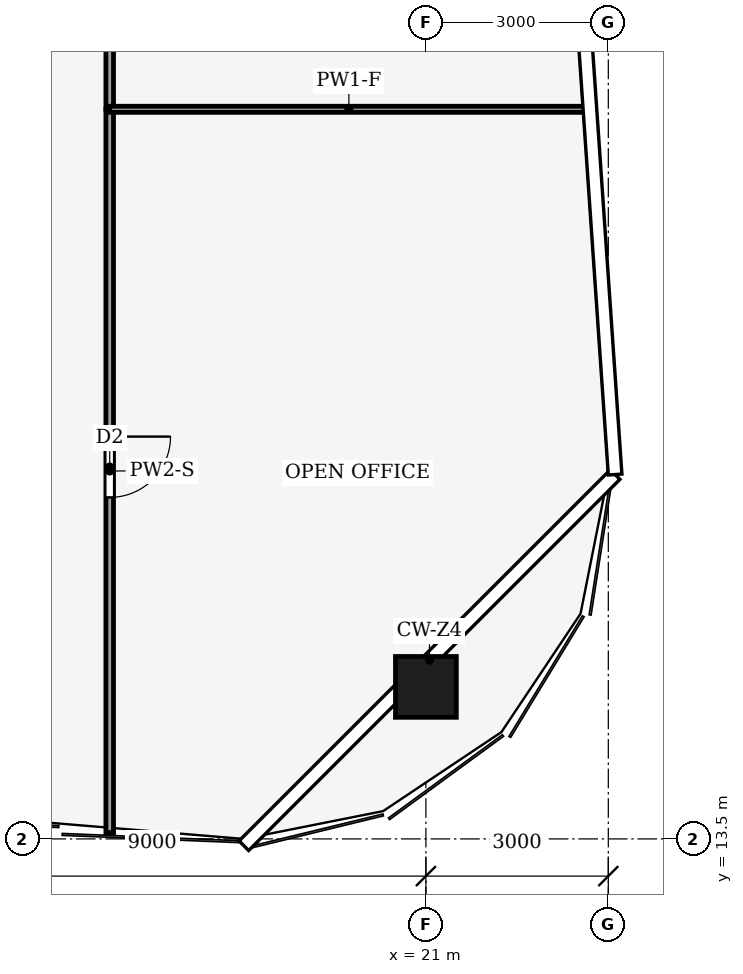
"""IFC4 building model, lengths in metres.
Left out: names, types, materials, properties, quantities, classifications, styles, units other than length and angle.
Written with IfcOpenShell. Run it as: python <this file> out.ifc"""

import sys

from ifc_helpers import new_model, si_unit, direction, frame, frame_2d, origin, origin_2d, place, context, subcontext, project, spatial, rectangle, hollow_rectangle, extrude, element, fill, save


model = new_model("IFC4")
c1 = context("Model", 3, precision=1e-05, world=origin(), true_north=direction((0.0, 1.0)))
c2 = subcontext(c1, "Body", "Model", "MODEL_VIEW")
j1 = project(units=[si_unit("LENGTHUNIT", "METRE"), si_unit("PLANEANGLEUNIT", "RADIAN")], contexts=[c1])
p1 = place(None, origin())
s1 = spatial("IfcSite", under=j1, at=p1, CompositionType="ELEMENT")
p2 = place(p1, origin())
s2 = spatial("IfcBuilding", under=s1, at=p2, CompositionType="ELEMENT")
p3 = place(p2, frame((0.0, 0.0, 246.0)))
s3 = spatial("IfcBuildingStorey", under=s2, at=p3, CompositionType="ELEMENT", Elevation=246.0)
p4 = place(p3, frame((21.0, 16.0, 0.0), z_axis=(0.0, 0.0, 1.0), x_axis=(1.0, 0.0, 0.0)))
e1 = element("IfcColumn", 1, at=p4, inside=s3, PredefinedType="COLUMN", context=c2, shape_type="SweptSolid", body=[
    extrude(hollow_rectangle(XDim=1.0, YDim=1.0, WallThickness=0.045, at=origin_2d()), origin(), (0.0, 0.0, 1.0), 4.0),
])
p5 = place(p3, frame((15.8, 25.5, 0.0), z_axis=(0.0, 0.0, 1.0), x_axis=(0.0, -1.0, 0.0)))
e2 = element("IfcWall", 2, at=p5, inside=s3, PredefinedType="PARTITIONING", context=c2, shape_type="SweptSolid", body=[
    extrude(rectangle(XDim=11.897, YDim=0.125, at=frame_2d((5.948, 0.0))), origin(), (0.0, 0.0, 1.0), 3.04),
])
p6 = place(p5, frame((5.383, 0.0, 0.0)))
e3 = element("IfcOpeningElement", 3, at=p6, cuts=e2, PredefinedType="OPENING", context=c2, shape_type="SweptSolid", body=[
    extrude(rectangle(XDim=1.0, YDim=2.1, at=frame_2d((0.5, 1.05))), frame((0.0, 0.073, 0.0), z_axis=(0.0, -1.0, 0.0), x_axis=(1.0, 0.0, 0.0)), (0.0, 0.0, 1.0), 0.145),
])
p7 = place(p3, frame((15.8, 28.5, 0.0), z_axis=(0.0, 0.0, 1.0), x_axis=(0.0, -1.0, 0.0)))
e4 = element("IfcWall", 4, at=p7, inside=s3, PredefinedType="PARTITIONING", context=c2, shape_type="SweptSolid", body=[
    extrude(rectangle(XDim=3.0, YDim=0.125, at=frame_2d((1.5, 0.0))), origin(), (0.0, 0.0, 1.0), 3.87),
])
p8 = place(p7, frame((1.05, 0.0, 0.0)))
e5 = element("IfcOpeningElement", 5, at=p8, cuts=e4, PredefinedType="OPENING", context=c2, shape_type="SweptSolid", body=[
    extrude(rectangle(XDim=0.9, YDim=2.1, at=frame_2d((0.45, 1.05))), frame((0.0, 0.073, 0.0), z_axis=(0.0, -1.0, 0.0), x_axis=(1.0, 0.0, 0.0)), (0.0, 0.0, 1.0), 0.145),
])
p9 = place(p3, frame((23.666, 25.5, 0.0), z_axis=(0.0, 0.0, 1.0), x_axis=(-1.0, 0.0, 0.0)))
e6 = element("IfcWall", 6, at=p9, inside=s3, PredefinedType="PARTITIONING", context=c2, shape_type="SweptSolid", body=[
    extrude(rectangle(XDim=7.866, YDim=0.1, at=frame_2d((3.933, 0.0))), origin(), (0.0, 0.0, 1.0), 3.04),
])
p10 = place(p6, origin())
e7 = element("IfcDoor", 7, at=p10, inside=s3, OperationType="SINGLE_SWING_LEFT", PredefinedType="DOOR", context=c2, shape_type="SweptSolid", body=[
    extrude(rectangle(XDim=1.0, YDim=2.1, at=frame_2d((0.5, 1.05))), frame((0.0, 0.025, 0.0), z_axis=(0.0, -1.0, 0.0), x_axis=(1.0, 0.0, 0.0)), (0.0, 0.0, 1.0), 0.05),
])
fill(e3, e7)
save(model, sys.argv[1])
